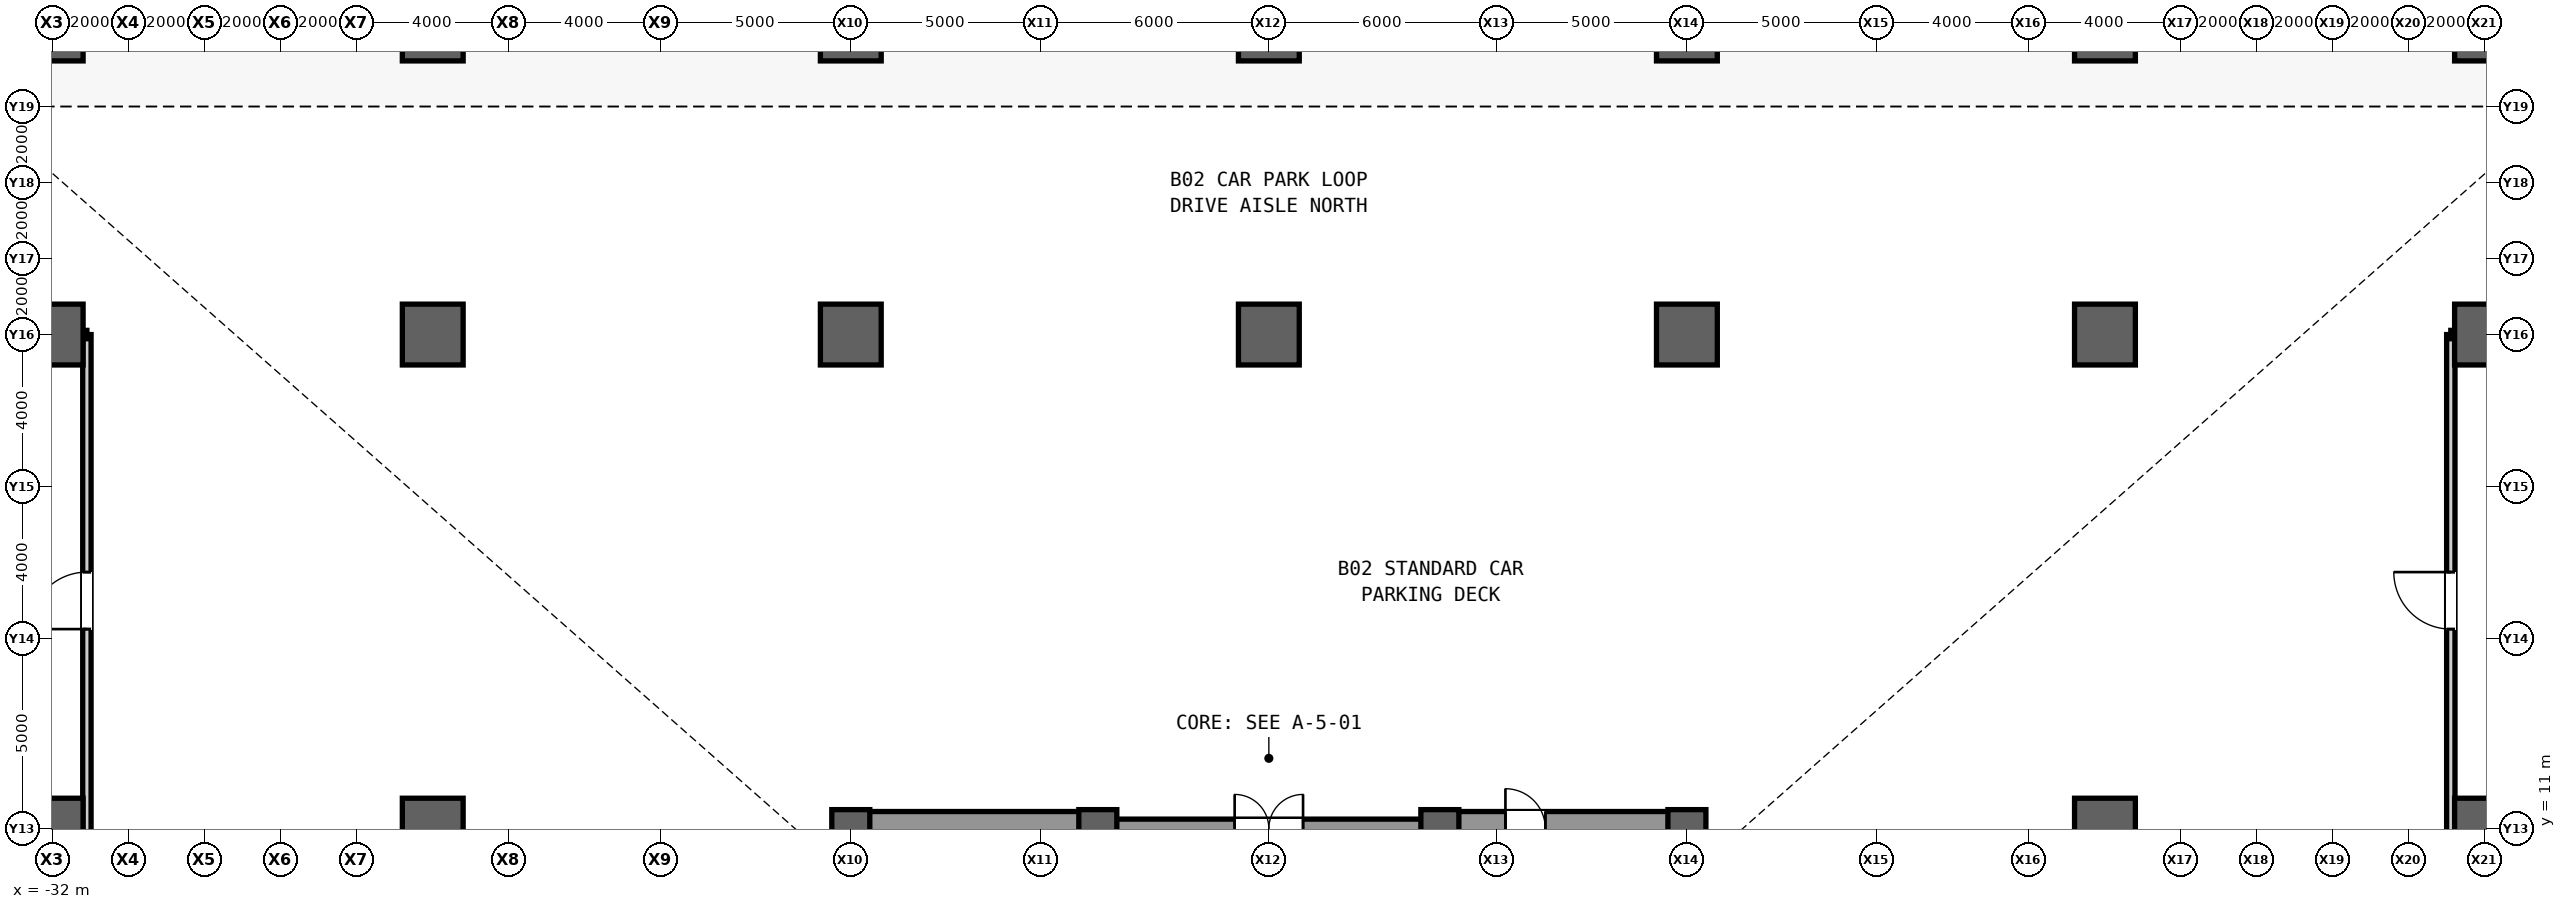
"""IFC4 building model, lengths in metres.
Left out: names, types, materials, properties, quantities, classifications, styles, units other than length and angle.
Written with IfcOpenShell. Run it as: python <this file> out.ifc"""

import sys

from ifc_helpers import new_model, si_unit, direction, frame, frame_2d, origin, origin_2d, place, context, subcontext, project, spatial, rectangle, extrude, source, transform, mapped, element, fill, save


model = new_model("IFC4")
c1 = context("Model", 3, precision=1e-05, world=origin(), true_north=direction((0.0, 1.0)))
c2 = subcontext(c1, "Body", "Model", "MODEL_VIEW")
j1 = project(units=[si_unit("LENGTHUNIT", "METRE"), si_unit("PLANEANGLEUNIT", "RADIAN")], contexts=[c1])
p1 = place(None, origin())
s1 = spatial("IfcSite", under=j1, at=p1, CompositionType="ELEMENT")
p2 = place(p1, origin())
s2 = spatial("IfcBuilding", under=s1, at=p2, CompositionType="ELEMENT")
p3 = place(p2, frame((0.0, 0.0, -9.6)))
s3 = spatial("IfcBuildingStorey", under=s2, at=p3, CompositionType="ELEMENT", Elevation=-9.6)
m1 = source(origin(), c2, "Body", "SweptSolid", [
    extrude(rectangle(XDim=22.0, YDim=0.6, at=frame_2d((11.0, 0.0))), origin(), (0.0, 0.0, 1.0), 4.48),
])
p4 = place(p3, frame((-11.0, -11.0, 0.0), z_axis=(0.0, 0.0, 1.0), x_axis=(0.0, 1.0, 0.0)))
e1 = element("IfcWall", 1, at=p4, inside=s3, PredefinedType="SHEAR", context=c2, shape_type="MappedRepresentation", body=[
    mapped(m1, transform((0.0, 0.0, 0.0), scale=1.0)),
])
m2 = source(origin(), c2, "Body", "SweptSolid", [
    extrude(rectangle(XDim=1.1, YDim=2.2, at=frame_2d((0.55, 1.1))), frame((0.0, 0.31, 0.0), z_axis=(0.0, -1.0, 0.0), x_axis=(1.0, 0.0, 0.0)), (0.0, 0.0, 1.0), 0.62),
])
p5 = place(p4, frame((0.8, 0.0, 0.0)))
e2 = element("IfcOpeningElement", 2, at=p5, cuts=e1, PredefinedType="OPENING", context=c2, shape_type="MappedRepresentation", body=[
    mapped(m2, transform((0.0, 0.0, 0.0), scale=1.0)),
])
p6 = place(p4, frame((12.5, 0.0, 0.0)))
e3 = element("IfcOpeningElement", 3, at=p6, cuts=e1, PredefinedType="OPENING", context=c2, shape_type="MappedRepresentation", body=[
    mapped(m2, transform((0.0, 0.0, 0.0), scale=1.0)),
])
m3 = source(origin(), c2, "Body", "SweptSolid", [
    extrude(rectangle(XDim=0.9, YDim=2.15, at=frame_2d((0.45, 1.075))), frame((0.0, 0.31, 0.0), z_axis=(0.0, -1.0, 0.0), x_axis=(1.0, 0.0, 0.0)), (0.0, 0.0, 1.0), 0.62),
])
p7 = place(p4, frame((6.2, 0.0, 0.0)))
e4 = element("IfcOpeningElement", 4, at=p7, cuts=e1, PredefinedType="OPENING", context=c2, shape_type="MappedRepresentation", body=[
    mapped(m3, transform((0.0, 0.0, 0.0), scale=1.0)),
])
p8 = place(p4, frame((8.525, 0.0, 0.0)))
e5 = element("IfcOpeningElement", 5, at=p8, cuts=e1, PredefinedType="OPENING", context=c2, shape_type="MappedRepresentation", body=[
    mapped(m3, transform((0.0, 0.0, 0.0), scale=1.0)),
])
m4 = source(origin(), c2, "Body", "SweptSolid", [
    extrude(rectangle(XDim=1.3, YDim=2.3, at=frame_2d((0.65, 1.15))), frame((0.0, 0.31, 0.0), z_axis=(0.0, -1.0, 0.0), x_axis=(1.0, 0.0, 0.0)), (0.0, 0.0, 1.0), 0.62),
])
p9 = place(p4, frame((2.7, 0.0, 0.0)))
e6 = element("IfcOpeningElement", 6, at=p9, cuts=e1, PredefinedType="OPENING", context=c2, shape_type="MappedRepresentation", body=[
    mapped(m4, transform((0.0, 0.0, 0.0), scale=1.0)),
])
p10 = place(p3, frame((11.0, -11.0, 0.0), z_axis=(0.0, 0.0, 1.0), x_axis=(0.0, 1.0, 0.0)))
e7 = element("IfcWall", 7, at=p10, inside=s3, PredefinedType="SHEAR", context=c2, shape_type="MappedRepresentation", body=[
    mapped(m1, transform((0.0, 0.0, 0.0), scale=1.0)),
])
p11 = place(p10, frame((0.8, 0.0, 0.0)))
e8 = element("IfcOpeningElement", 8, at=p11, cuts=e7, PredefinedType="OPENING", context=c2, shape_type="MappedRepresentation", body=[
    mapped(m2, transform((0.0, 0.0, 0.0), scale=1.0)),
])
p12 = place(p10, frame((6.2, 0.0, 0.0)))
e9 = element("IfcOpeningElement", 9, at=p12, cuts=e7, PredefinedType="OPENING", context=c2, shape_type="MappedRepresentation", body=[
    mapped(m3, transform((0.0, 0.0, 0.0), scale=1.0)),
])
p13 = place(p10, frame((8.525, 0.0, 0.0)))
e10 = element("IfcOpeningElement", 10, at=p13, cuts=e7, PredefinedType="OPENING", context=c2, shape_type="MappedRepresentation", body=[
    mapped(m3, transform((0.0, 0.0, 0.0), scale=1.0)),
])
p14 = place(p10, frame((2.7, 0.0, 0.0)))
e11 = element("IfcOpeningElement", 11, at=p14, cuts=e7, PredefinedType="OPENING", context=c2, shape_type="MappedRepresentation", body=[
    mapped(m4, transform((0.0, 0.0, 0.0), scale=1.0)),
])
p15 = place(p10, frame((13.35, 0.0, 0.0)))
e12 = element("IfcOpeningElement", 12, at=p15, cuts=e7, PredefinedType="OPENING", context=c2, shape_type="MappedRepresentation", body=[
    mapped(m4, transform((0.0, 0.0, 0.0), scale=1.0)),
])
m5 = source(origin(), c2, "Body", "SweptSolid", [
    extrude(rectangle(XDim=5.85, YDim=0.9, at=frame_2d((2.925, 0.0))), origin(), (0.0, 0.0, 1.0), 4.48),
])
p16 = place(p3, frame((-10.7, 11.0, 0.0), z_axis=(0.0, 0.0, 1.0), x_axis=(1.0, 0.0, 0.0)))
e13 = element("IfcWall", 13, at=p16, inside=s3, PredefinedType="SHEAR", context=c2, shape_type="MappedRepresentation", body=[
    mapped(m5, transform((0.0, 0.0, 0.0), scale=1.0)),
])
p17 = place(p3, frame((4.85, 11.0, 0.0), z_axis=(0.0, 0.0, 1.0), x_axis=(1.0, 0.0, 0.0)))
e14 = element("IfcWall", 14, at=p17, inside=s3, PredefinedType="SHEAR", context=c2, shape_type="MappedRepresentation", body=[
    mapped(m5, transform((0.0, 0.0, 0.0), scale=1.0)),
])
m6 = source(origin(), c2, "Body", "SweptSolid", [
    extrude(rectangle(XDim=1.05, YDim=2.2, at=frame_2d((0.525, 1.1))), frame((0.0, 0.46, 0.0), z_axis=(0.0, -1.0, 0.0), x_axis=(1.0, 0.0, 0.0)), (0.0, 0.0, 1.0), 0.92),
])
p18 = place(p17, frame((1.375, 0.0, 0.0)))
e15 = element("IfcOpeningElement", 15, at=p18, cuts=e14, PredefinedType="OPENING", context=c2, shape_type="MappedRepresentation", body=[
    mapped(m6, transform((0.0, 0.0, 0.0), scale=1.0)),
])
m7 = source(origin(), c2, "Body", "SweptSolid", [
    extrude(rectangle(XDim=9.2, YDim=0.5, at=frame_2d((4.6, 0.0))), origin(), (0.0, 0.0, 1.0), 4.48),
])
p19 = place(p3, frame((-4.6, 11.0, 0.0), z_axis=(0.0, 0.0, 1.0), x_axis=(1.0, 0.0, 0.0)))
e16 = element("IfcWall", 16, at=p19, inside=s3, PredefinedType="SHEAR", context=c2, shape_type="MappedRepresentation", body=[
    mapped(m7, transform((0.0, 0.0, 0.0), scale=1.0)),
])
m8 = source(origin(), c2, "Body", "SweptSolid", [
    extrude(rectangle(XDim=1.8, YDim=2.25, at=frame_2d((0.9, 1.125))), frame((0.0, 0.26, 0.0), z_axis=(0.0, -1.0, 0.0), x_axis=(1.0, 0.0, 0.0)), (0.0, 0.0, 1.0), 0.52),
])
p20 = place(p19, frame((3.7, 0.0, 0.0)))
e17 = element("IfcOpeningElement", 17, at=p20, cuts=e16, PredefinedType="OPENING", context=c2, shape_type="MappedRepresentation", body=[
    mapped(m8, transform((0.0, 0.0, 0.0), scale=1.0)),
])
m9 = source(origin(), c2, "Body", "SweptSolid", [
    extrude(rectangle(XDim=1.6, YDim=1.6, at=origin_2d()), origin(), (0.0, 0.0, 1.0), 4.8),
])
for number, where, z_axis, x_axis in (
    (18, (-32.0, 11.0, 0.0), (0.0, 0.0, 1.0), (1.0, 0.0, 0.0)),
    (19, (-32.0, 24.0, 0.0), (0.0, 0.0, 1.0), (1.0, 0.0, 0.0)),
    (20, (-32.0, 32.0, 0.0), (0.0, 0.0, 1.0), (1.0, 0.0, 0.0)),
    (21, (-22.0, 11.0, 0.0), (0.0, 0.0, 1.0), (1.0, 0.0, 0.0)),
    (22, (-22.0, 24.0, 0.0), (0.0, 0.0, 1.0), (1.0, 0.0, 0.0)),
    (23, (-22.0, 32.0, 0.0), (0.0, 0.0, 1.0), (1.0, 0.0, 0.0)),
):
    element("IfcColumn", number, at=place(p3, frame(where, z_axis=z_axis, x_axis=x_axis)), inside=s3, PredefinedType="COLUMN", context=c2, shape_type="MappedRepresentation", body=[
        mapped(m9, transform((0.0, 0.0, 0.0), scale=1.0)),
    ])
m10 = source(origin(), c2, "Body", "SweptSolid", [
    extrude(rectangle(XDim=1.0, YDim=1.0, at=origin_2d()), origin(), (0.0, 0.0, 1.0), 4.8),
])
p21 = place(p3, frame((-11.0, 11.0, 0.0), z_axis=(0.0, 0.0, 1.0), x_axis=(1.0, 0.0, 0.0)))
e24 = element("IfcColumn", 24, at=p21, inside=s3, PredefinedType="COLUMN", context=c2, shape_type="MappedRepresentation", body=[
    mapped(m10, transform((0.0, 0.0, 0.0), scale=1.0)),
])
for number, where, z_axis, x_axis in (
    (25, (-11.0, 24.0, 0.0), (0.0, 0.0, 1.0), (1.0, 0.0, 0.0)),
    (26, (-11.0, 32.0, 0.0), (0.0, 0.0, 1.0), (1.0, 0.0, 0.0)),
):
    element("IfcColumn", number, at=place(p3, frame(where, z_axis=z_axis, x_axis=x_axis)), inside=s3, PredefinedType="COLUMN", context=c2, shape_type="MappedRepresentation", body=[
        mapped(m9, transform((0.0, 0.0, 0.0), scale=1.0)),
    ])
p22 = place(p3, frame((-4.5, 11.0, 0.0), z_axis=(0.0, 0.0, 1.0), x_axis=(1.0, 0.0, 0.0)))
e27 = element("IfcColumn", 27, at=p22, inside=s3, PredefinedType="COLUMN", context=c2, shape_type="MappedRepresentation", body=[
    mapped(m10, transform((0.0, 0.0, 0.0), scale=1.0)),
])
for number, where, z_axis, x_axis in (
    (28, (0.0, 24.0, 0.0), (0.0, 0.0, 1.0), (1.0, 0.0, 0.0)),
    (29, (0.0, 32.0, 0.0), (0.0, 0.0, 1.0), (1.0, 0.0, 0.0)),
):
    element("IfcColumn", number, at=place(p3, frame(where, z_axis=z_axis, x_axis=x_axis)), inside=s3, PredefinedType="COLUMN", context=c2, shape_type="MappedRepresentation", body=[
        mapped(m9, transform((0.0, 0.0, 0.0), scale=1.0)),
    ])
for number, where, z_axis, x_axis in (
    (30, (4.5, 11.0, 0.0), (0.0, 0.0, 1.0), (1.0, 0.0, 0.0)),
    (31, (11.0, 11.0, 0.0), (0.0, 0.0, 1.0), (1.0, 0.0, 0.0)),
):
    element("IfcColumn", number, at=place(p3, frame(where, z_axis=z_axis, x_axis=x_axis)), inside=s3, PredefinedType="COLUMN", context=c2, shape_type="MappedRepresentation", body=[
        mapped(m10, transform((0.0, 0.0, 0.0), scale=1.0)),
    ])
for number, where, z_axis, x_axis in (
    (32, (11.0, 24.0, 0.0), (0.0, 0.0, 1.0), (1.0, 0.0, 0.0)),
    (33, (11.0, 32.0, 0.0), (0.0, 0.0, 1.0), (1.0, 0.0, 0.0)),
    (34, (22.0, 11.0, 0.0), (0.0, 0.0, 1.0), (1.0, 0.0, 0.0)),
    (35, (22.0, 24.0, 0.0), (0.0, 0.0, 1.0), (1.0, 0.0, 0.0)),
    (36, (22.0, 32.0, 0.0), (0.0, 0.0, 1.0), (1.0, 0.0, 0.0)),
    (37, (32.0, 11.0, 0.0), (0.0, 0.0, 1.0), (1.0, 0.0, 0.0)),
    (38, (32.0, 24.0, 0.0), (0.0, 0.0, 1.0), (1.0, 0.0, 0.0)),
    (39, (32.0, 32.0, 0.0), (0.0, 0.0, 1.0), (1.0, 0.0, 0.0)),
):
    element("IfcColumn", number, at=place(p3, frame(where, z_axis=z_axis, x_axis=x_axis)), inside=s3, PredefinedType="COLUMN", context=c2, shape_type="MappedRepresentation", body=[
        mapped(m9, transform((0.0, 0.0, 0.0), scale=1.0)),
    ])
m11 = source(origin(), c2, "Body", "SweptSolid", [
    extrude(rectangle(XDim=48.0, YDim=0.22, at=frame_2d((24.0, 0.0))), origin(), (0.0, 0.0, 1.0), 4.48),
])
p23 = place(p3, frame((-31.1, -24.0, 0.0), z_axis=(0.0, 0.0, 1.0), x_axis=(0.0, 1.0, 0.0)))
e40 = element("IfcWall", 40, at=p23, inside=s3, PredefinedType="PARTITIONING", context=c2, shape_type="MappedRepresentation", body=[
    mapped(m11, transform((0.0, 0.0, 0.0), scale=1.0)),
])
m12 = source(origin(), c2, "Body", "SweptSolid", [
    extrude(rectangle(XDim=1.5, YDim=2.3, at=frame_2d((0.75, 1.15))), frame((0.0, 0.12, 0.0), z_axis=(0.0, -1.0, 0.0), x_axis=(1.0, 0.0, 0.0)), (0.0, 0.0, 1.0), 0.24),
])
p24 = place(p23, frame((6.25, 0.0, 0.0)))
e41 = element("IfcOpeningElement", 41, at=p24, cuts=e40, PredefinedType="OPENING", context=c2, shape_type="MappedRepresentation", body=[
    mapped(m12, transform((0.0, 0.0, 0.0), scale=1.0)),
])
p25 = place(p23, frame((40.25, 0.0, 0.0)))
e42 = element("IfcOpeningElement", 42, at=p25, cuts=e40, PredefinedType="OPENING", context=c2, shape_type="MappedRepresentation", body=[
    mapped(m12, transform((0.0, 0.0, 0.0), scale=1.0)),
])
m13 = source(origin(), c2, "Body", "SweptSolid", [
    extrude(rectangle(XDim=14.7, YDim=0.22, at=frame_2d((7.35, 0.0))), origin(), (0.0, 0.0, 1.0), 3.444),
])
p26 = place(p3, frame((-45.8, 24.0, 0.0), z_axis=(0.0, 0.0, 1.0), x_axis=(1.0, 0.0, 0.0)))
e43 = element("IfcWall", 43, at=p26, inside=s3, PredefinedType="PARTITIONING", context=c2, shape_type="MappedRepresentation", body=[
    mapped(m13, transform((0.0, 0.0, 0.0), scale=1.0)),
])
p27 = place(p3, frame((31.1, -24.0, 0.0), z_axis=(0.0, 0.0, 1.0), x_axis=(0.0, 1.0, 0.0)))
e44 = element("IfcWall", 44, at=p27, inside=s3, PredefinedType="PARTITIONING", context=c2, shape_type="MappedRepresentation", body=[
    mapped(m11, transform((0.0, 0.0, 0.0), scale=1.0)),
])
p28 = place(p27, frame((6.25, 0.0, 0.0)))
e45 = element("IfcOpeningElement", 45, at=p28, cuts=e44, PredefinedType="OPENING", context=c2, shape_type="MappedRepresentation", body=[
    mapped(m12, transform((0.0, 0.0, 0.0), scale=1.0)),
])
p29 = place(p27, frame((40.25, 0.0, 0.0)))
e46 = element("IfcOpeningElement", 46, at=p29, cuts=e44, PredefinedType="OPENING", context=c2, shape_type="MappedRepresentation", body=[
    mapped(m12, transform((0.0, 0.0, 0.0), scale=1.0)),
])
p30 = place(p3, frame((31.1, 24.0, 0.0), z_axis=(0.0, 0.0, 1.0), x_axis=(1.0, 0.0, 0.0)))
e47 = element("IfcWall", 47, at=p30, inside=s3, PredefinedType="PARTITIONING", context=c2, shape_type="MappedRepresentation", body=[
    mapped(m13, transform((0.0, 0.0, 0.0), scale=1.0)),
])
m14 = source(origin(), c2, "Body", "SweptSolid", [
    extrude(rectangle(XDim=1.05, YDim=2.2, at=frame_2d((0.525, 1.1))), frame((0.0, 0.025, 0.0), z_axis=(0.0, -1.0, 0.0), x_axis=(1.0, 0.0, 0.0)), (0.0, 0.0, 1.0), 0.05),
])
p31 = place(p18, origin())
e48 = element("IfcDoor", 48, at=p31, inside=s3, OperationType="SINGLE_SWING_LEFT", PredefinedType="DOOR", context=c2, shape_type="MappedRepresentation", body=[
    mapped(m14, transform((0.0, 0.0, 0.0), scale=1.0)),
])
fill(e15, e48)
m15 = source(origin(), c2, "Body", "SweptSolid", [
    extrude(rectangle(XDim=1.8, YDim=2.25, at=frame_2d((0.9, 1.125))), frame((0.0, 0.025, 0.0), z_axis=(0.0, -1.0, 0.0), x_axis=(1.0, 0.0, 0.0)), (0.0, 0.0, 1.0), 0.05),
])
p32 = place(p20, origin())
e49 = element("IfcDoor", 49, at=p32, inside=s3, OperationType="SINGLE_SWING_RIGHT", PredefinedType="DOOR", context=c2, shape_type="MappedRepresentation", body=[
    mapped(m15, transform((0.0, 0.0, 0.0), scale=1.0)),
])
fill(e17, e49)
m16 = source(origin(), c2, "Body", "SweptSolid", [
    extrude(rectangle(XDim=1.5, YDim=2.3, at=frame_2d((0.75, 1.15))), frame((0.0, 0.025, 0.0), z_axis=(0.0, -1.0, 0.0), x_axis=(1.0, 0.0, 0.0)), (0.0, 0.0, 1.0), 0.05),
])
p33 = place(p25, origin())
e50 = element("IfcDoor", 50, at=p33, inside=s3, OperationType="SINGLE_SWING_LEFT", PredefinedType="DOOR", context=c2, shape_type="MappedRepresentation", body=[
    mapped(m16, transform((0.0, 0.0, 0.0), scale=1.0)),
])
fill(e42, e50)
p34 = place(p29, origin())
e51 = element("IfcDoor", 51, at=p34, inside=s3, OperationType="SINGLE_SWING_RIGHT", PredefinedType="DOOR", context=c2, shape_type="MappedRepresentation", body=[
    mapped(m16, transform((0.0, 0.0, 0.0), scale=1.0)),
])
fill(e46, e51)
save(model, sys.argv[1])
